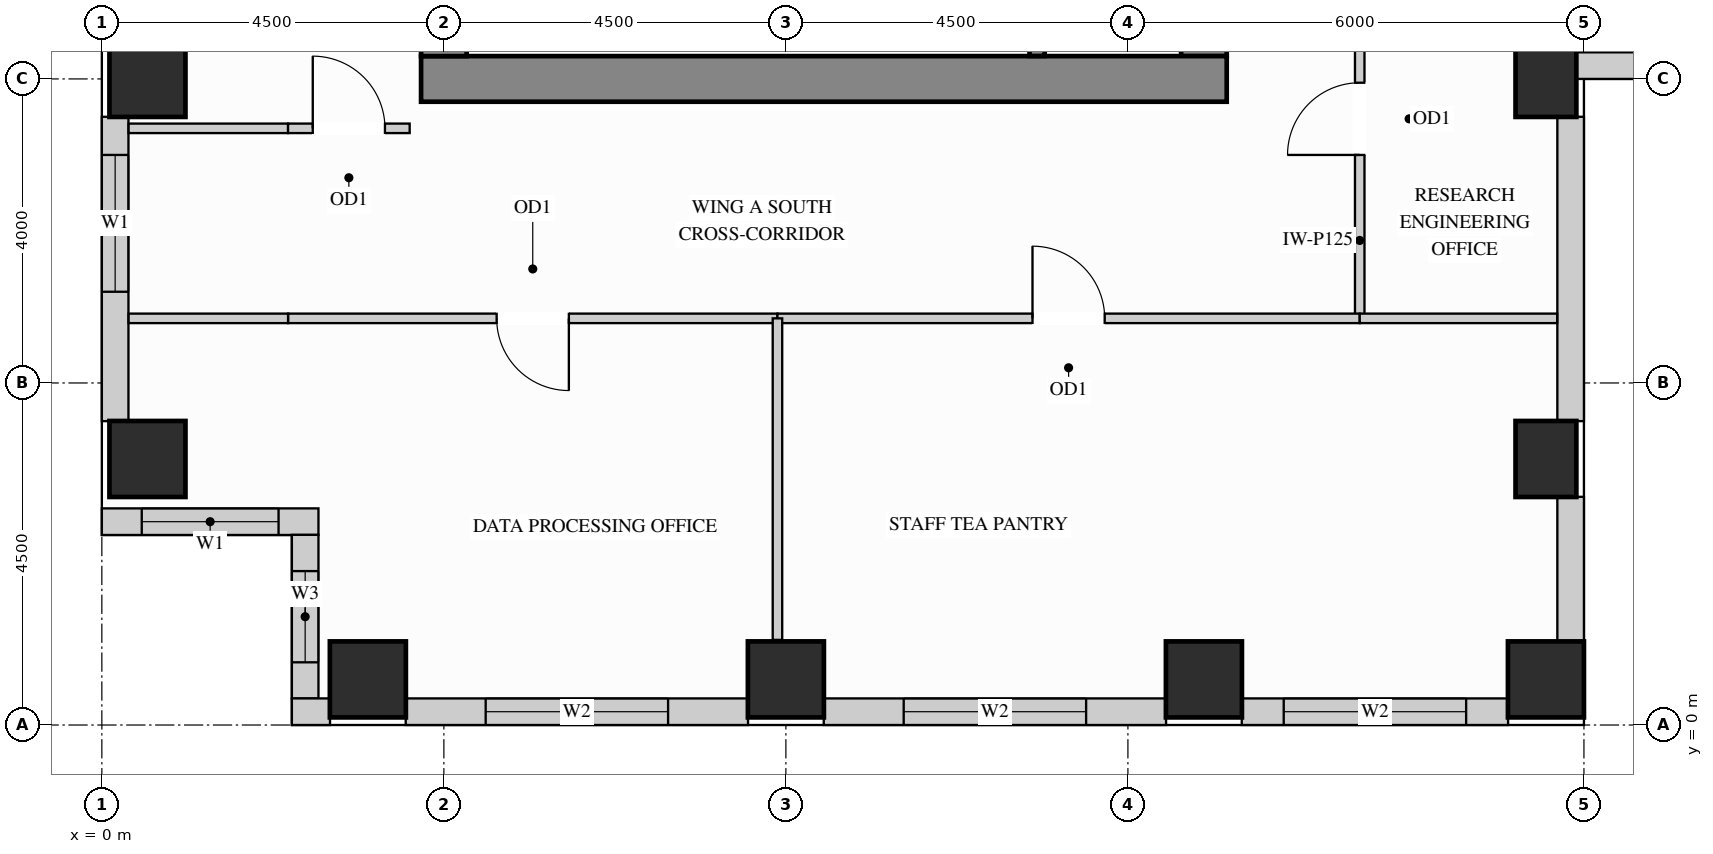
"""IFC4 building model, lengths in metres.
Left out: names, types, materials, properties, quantities, classifications, styles, units other than length and angle.
Written with IfcOpenShell. Run it as: python <this file> out.ifc"""

import sys

from ifc_helpers import new_model, si_unit, direction, frame, frame_2d, origin, origin_2d, place, context, subcontext, project, spatial, rectangle, extrude, source, transform, mapped, element, fill, save


model = new_model("IFC4")
c1 = context("Model", 3, precision=1e-05, world=origin(), true_north=direction((0.0, 1.0)))
c2 = subcontext(c1, "Body", "Model", "MODEL_VIEW")
j1 = project(units=[si_unit("LENGTHUNIT", "METRE"), si_unit("PLANEANGLEUNIT", "RADIAN")], contexts=[c1])
p1 = place(None, origin())
s1 = spatial("IfcSite", under=j1, at=p1, CompositionType="ELEMENT")
p2 = place(p1, origin())
s2 = spatial("IfcBuilding", under=s1, at=p2, CompositionType="ELEMENT")
p3 = place(p2, frame((0.0, 0.0, 161.1)))
s3 = spatial("IfcBuildingStorey", under=s2, at=p3, CompositionType="ELEMENT", Elevation=161.1)
m1 = source(origin(), c2, "Body", "SweptSolid", [
    extrude(rectangle(XDim=0.8, YDim=1.0, at=origin_2d()), origin(), (0.0, 0.0, 1.0), 3.4),
])
for number, where, z_axis, x_axis in (
    (1, (19.0, 3.5, 0.0), (0.0, 0.0, 1.0), (1.0, 0.0, 0.0)),
    (2, (19.0, 8.5, 0.0), (0.0, 0.0, 1.0), (1.0, 0.0, 0.0)),
):
    element("IfcColumn", number, at=place(p3, frame(where, z_axis=z_axis, x_axis=x_axis)), inside=s3, PredefinedType="COLUMN", context=c2, shape_type="MappedRepresentation", body=[
        mapped(m1, transform((0.0, 0.0, 0.0), x_axis=(1.0, 0.0, 0.0), y_axis=(0.0, 1.0, 0.0), z_axis=(0.0, 0.0, 1.0))),
    ])
m2 = source(origin(), c2, "Body", "SweptSolid", [
    extrude(rectangle(XDim=1.0, YDim=1.0, at=origin_2d()), origin(), (0.0, 0.0, 1.0), 3.4),
])
for number, where, z_axis, x_axis in (
    (3, (14.5, 0.6, 0.0), (0.0, 0.0, 1.0), (1.0, 0.0, 0.0)),
    (4, (19.0, 0.6, 0.0), (0.0, 0.0, 1.0), (1.0, 0.0, 0.0)),
    (5, (3.5, 0.6, 0.0), (0.0, 0.0, 1.0), (1.0, 0.0, 0.0)),
    (6, (9.0, 0.6, 0.0), (0.0, 0.0, 1.0), (1.0, 0.0, 0.0)),
    (7, (0.6, 3.5, 0.0), (0.0, 0.0, 1.0), (1.0, 0.0, 0.0)),
    (8, (0.6, 8.5, 0.0), (0.0, 0.0, 1.0), (1.0, 0.0, 0.0)),
):
    element("IfcColumn", number, at=place(p3, frame(where, z_axis=z_axis, x_axis=x_axis)), inside=s3, PredefinedType="COLUMN", context=c2, shape_type="MappedRepresentation", body=[
        mapped(m2, transform((0.0, 0.0, 0.0), x_axis=(1.0, 0.0, 0.0), y_axis=(0.0, 1.0, 0.0), z_axis=(0.0, 0.0, 1.0))),
    ])
m3 = source(origin(), c2, "Body", "SweptSolid", [
    extrude(rectangle(XDim=10.02, YDim=0.6, at=frame_2d((5.01, 0.0))), origin(), (0.0, 0.0, 1.0), 3.4),
])
p4 = place(p3, frame((14.5, 8.8, 0.0), z_axis=(0.0, 0.0, 1.0), x_axis=(0.0, 1.0, 0.0)))
e9 = element("IfcWall", 9, at=p4, inside=s3, PredefinedType="SHEAR", context=c2, shape_type="MappedRepresentation", body=[
    mapped(m3, transform((0.0, 0.0, 0.0), x_axis=(1.0, 0.0, 0.0), y_axis=(0.0, 1.0, 0.0), z_axis=(0.0, 0.0, 1.0))),
])
m4 = source(origin(), c2, "Body", "SweptSolid", [
    extrude(rectangle(XDim=10.6, YDim=0.6, at=frame_2d((5.3, 0.0))), origin(), (0.0, 0.0, 1.0), 3.4),
])
p5 = place(p3, frame((4.2, 8.5, 0.0), z_axis=(0.0, 0.0, 1.0), x_axis=(1.0, 0.0, 0.0)))
e10 = element("IfcWall", 10, at=p5, inside=s3, PredefinedType="SHEAR", context=c2, shape_type="MappedRepresentation", body=[
    mapped(m4, transform((0.0, 0.0, 0.0), x_axis=(1.0, 0.0, 0.0), y_axis=(0.0, 1.0, 0.0), z_axis=(0.0, 0.0, 1.0))),
])
m5 = source(origin(), c2, "Body", "SweptSolid", [
    extrude(rectangle(XDim=20.4, YDim=0.6, at=frame_2d((10.2, 0.0))), origin(), (0.0, 0.0, 1.0), 3.4),
])
p6 = place(p3, frame((4.5, 8.8, 0.0), z_axis=(0.0, 0.0, 1.0), x_axis=(0.0, 1.0, 0.0)))
e11 = element("IfcWall", 11, at=p6, inside=s3, PredefinedType="SHEAR", context=c2, shape_type="MappedRepresentation", body=[
    mapped(m5, transform((0.0, 0.0, 0.0), x_axis=(1.0, 0.0, 0.0), y_axis=(0.0, 1.0, 0.0), z_axis=(0.0, 0.0, 1.0))),
])
p7 = place(p3, frame((0.175, 8.002, 0.0), z_axis=(0.0, 0.0, 1.0), x_axis=(0.0, -1.0, 0.0)))
e12 = element("IfcWall", 12, at=p7, inside=s3, PredefinedType="SOLIDWALL", context=c2, shape_type="SweptSolid", body=[
    extrude(rectangle(XDim=4.004, YDim=0.35, at=frame_2d((2.002, 0.0))), origin(), (0.0, 0.0, 1.0), 2.612),
])
p8 = place(p7, frame((0.502, 0.0, 0.78)))
e13 = element("IfcOpeningElement", 13, at=p8, cuts=e12, PredefinedType="OPENING", context=c2, shape_type="SweptSolid", body=[
    extrude(rectangle(XDim=1.8, YDim=1.652, at=frame_2d((0.9, 0.826))), frame((0.0, 0.185, 0.0), z_axis=(0.0, -1.0, 0.0), x_axis=(1.0, 0.0, 0.0)), (0.0, 0.0, 1.0), 0.37),
])
p9 = place(p3, frame((0.0, 2.675, 0.0), z_axis=(0.0, 0.0, 1.0), x_axis=(1.0, 0.0, 0.0)))
e14 = element("IfcWall", 14, at=p9, inside=s3, PredefinedType="SOLIDWALL", context=c2, shape_type="SweptSolid", body=[
    extrude(rectangle(XDim=2.85, YDim=0.35, at=frame_2d((1.425, 0.0))), origin(), (0.0, 0.0, 1.0), 3.385),
])
p10 = place(p9, frame((0.525, 0.0, 0.78)))
e15 = element("IfcOpeningElement", 15, at=p10, cuts=e14, PredefinedType="OPENING", context=c2, shape_type="SweptSolid", body=[
    extrude(rectangle(XDim=1.8, YDim=2.1, at=frame_2d((0.9, 1.05))), frame((0.0, 0.185, 0.0), z_axis=(0.0, -1.0, 0.0), x_axis=(1.0, 0.0, 0.0)), (0.0, 0.0, 1.0), 0.37),
])
p11 = place(p3, frame((2.675, 2.502, 0.0), z_axis=(0.0, 0.0, 1.0), x_axis=(0.0, -1.0, 0.0)))
e16 = element("IfcWall", 16, at=p11, inside=s3, PredefinedType="SOLIDWALL", context=c2, shape_type="SweptSolid", body=[
    extrude(rectangle(XDim=2.154, YDim=0.35, at=frame_2d((1.077, 0.0))), origin(), (0.0, 0.0, 1.0), 3.385),
])
p12 = place(p11, frame((0.477, 0.0, 0.78)))
e17 = element("IfcOpeningElement", 17, at=p12, cuts=e16, PredefinedType="OPENING", context=c2, shape_type="SweptSolid", body=[
    extrude(rectangle(XDim=1.2, YDim=2.1, at=frame_2d((0.6, 1.05))), frame((0.0, 0.185, 0.0), z_axis=(0.0, -1.0, 0.0), x_axis=(1.0, 0.0, 0.0)), (0.0, 0.0, 1.0), 0.37),
])
m6 = source(origin(), c2, "Body", "SweptSolid", [
    extrude(rectangle(XDim=0.502, YDim=0.35, at=frame_2d((0.251, 0.0))), origin(), (0.0, 0.0, 1.0), 3.385),
])
p13 = place(p3, frame((2.5, 0.175, 0.0), z_axis=(0.0, 0.0, 1.0), x_axis=(1.0, 0.0, 0.0)))
e18 = element("IfcWall", 18, at=p13, inside=s3, PredefinedType="SOLIDWALL", context=c2, shape_type="MappedRepresentation", body=[
    mapped(m6, transform((0.0, 0.0, 0.0), x_axis=(1.0, 0.0, 0.0), y_axis=(0.0, 1.0, 0.0), z_axis=(0.0, 0.0, 1.0))),
])
p14 = place(p3, frame((3.998, 0.175, 0.0), z_axis=(0.0, 0.0, 1.0), x_axis=(1.0, 0.0, 0.0)))
e19 = element("IfcWall", 19, at=p14, inside=s3, PredefinedType="SOLIDWALL", context=c2, shape_type="SweptSolid", body=[
    extrude(rectangle(XDim=4.504, YDim=0.35, at=frame_2d((2.252, 0.0))), origin(), (0.0, 0.0, 1.0), 2.612),
])
p15 = place(p14, frame((1.052, 0.0, 0.78)))
e20 = element("IfcOpeningElement", 20, at=p15, cuts=e19, PredefinedType="OPENING", context=c2, shape_type="SweptSolid", body=[
    extrude(rectangle(XDim=2.4, YDim=1.652, at=frame_2d((1.2, 0.826))), frame((0.0, 0.185, 0.0), z_axis=(0.0, -1.0, 0.0), x_axis=(1.0, 0.0, 0.0)), (0.0, 0.0, 1.0), 0.37),
])
p16 = place(p3, frame((9.498, 0.175, 0.0), z_axis=(0.0, 0.0, 1.0), x_axis=(1.0, 0.0, 0.0)))
e21 = element("IfcWall", 21, at=p16, inside=s3, PredefinedType="SOLIDWALL", context=c2, shape_type="SweptSolid", body=[
    extrude(rectangle(XDim=4.504, YDim=0.35, at=frame_2d((2.252, 0.0))), origin(), (0.0, 0.0, 1.0), 2.612),
])
p17 = place(p16, frame((1.052, 0.0, 0.78)))
e22 = element("IfcOpeningElement", 22, at=p17, cuts=e21, PredefinedType="OPENING", context=c2, shape_type="SweptSolid", body=[
    extrude(rectangle(XDim=2.4, YDim=1.652, at=frame_2d((1.2, 0.826))), frame((0.0, 0.185, 0.0), z_axis=(0.0, -1.0, 0.0), x_axis=(1.0, 0.0, 0.0)), (0.0, 0.0, 1.0), 0.37),
])
p18 = place(p3, frame((14.998, 0.175, 0.0), z_axis=(0.0, 0.0, 1.0), x_axis=(1.0, 0.0, 0.0)))
e23 = element("IfcWall", 23, at=p18, inside=s3, PredefinedType="SOLIDWALL", context=c2, shape_type="SweptSolid", body=[
    extrude(rectangle(XDim=3.504, YDim=0.35, at=frame_2d((1.752, 0.0))), origin(), (0.0, 0.0, 1.0), 2.612),
])
p19 = place(p18, frame((0.552, 0.0, 0.78)))
e24 = element("IfcOpeningElement", 24, at=p19, cuts=e23, PredefinedType="OPENING", context=c2, shape_type="SweptSolid", body=[
    extrude(rectangle(XDim=2.4, YDim=1.652, at=frame_2d((1.2, 0.826))), frame((0.0, 0.185, 0.0), z_axis=(0.0, -1.0, 0.0), x_axis=(1.0, 0.0, 0.0)), (0.0, 0.0, 1.0), 0.37),
])
m7 = source(origin(), c2, "Body", "SweptSolid", [
    extrude(rectangle(XDim=1.904, YDim=0.35, at=frame_2d((0.952, 0.0))), origin(), (0.0, 0.0, 1.0), 2.612),
])
p20 = place(p3, frame((19.325, 1.098, 0.0), z_axis=(0.0, 0.0, 1.0), x_axis=(0.0, 1.0, 0.0)))
e25 = element("IfcWall", 25, at=p20, inside=s3, PredefinedType="SOLIDWALL", context=c2, shape_type="MappedRepresentation", body=[
    mapped(m7, transform((0.0, 0.0, 0.0), x_axis=(1.0, 0.0, 0.0), y_axis=(0.0, 1.0, 0.0), z_axis=(0.0, 0.0, 1.0))),
])
m8 = source(origin(), c2, "Body", "SweptSolid", [
    extrude(rectangle(XDim=4.004, YDim=0.35, at=frame_2d((2.002, 0.0))), origin(), (0.0, 0.0, 1.0), 2.612),
])
p21 = place(p3, frame((19.325, 3.998, 0.0), z_axis=(0.0, 0.0, 1.0), x_axis=(0.0, 1.0, 0.0)))
e26 = element("IfcWall", 26, at=p21, inside=s3, PredefinedType="SOLIDWALL", context=c2, shape_type="MappedRepresentation", body=[
    mapped(m8, transform((0.0, 0.0, 0.0), x_axis=(1.0, 0.0, 0.0), y_axis=(0.0, 1.0, 0.0), z_axis=(0.0, 0.0, 1.0))),
])
p22 = place(p3, frame((19.398, 8.675, 0.0), z_axis=(0.0, 0.0, 1.0), x_axis=(1.0, 0.0, 0.0)))
e27 = element("IfcWall", 27, at=p22, inside=s3, PredefinedType="SOLIDWALL", context=c2, shape_type="SweptSolid", body=[
    extrude(rectangle(XDim=3.604, YDim=0.35, at=frame_2d((1.802, 0.0))), origin(), (0.0, 0.0, 1.0), 3.385),
])
p23 = place(p22, frame((1.067, 0.0, 0.78)))
e28 = element("IfcOpeningElement", 28, at=p23, cuts=e27, PredefinedType="OPENING", context=c2, shape_type="SweptSolid", body=[
    extrude(rectangle(XDim=1.5, YDim=2.0, at=frame_2d((0.75, 1.0))), frame((0.0, 0.185, 0.0), z_axis=(0.0, -1.0, 0.0), x_axis=(1.0, 0.0, 0.0)), (0.0, 0.0, 1.0), 0.37),
])
p24 = place(p3, frame((16.55, 5.35, 0.0), z_axis=(0.0, 0.0, 1.0), x_axis=(0.0, 1.0, 0.0)))
e29 = element("IfcWall", 29, at=p24, inside=s3, PredefinedType="PARTITIONING", context=c2, shape_type="SweptSolid", body=[
    extrude(rectangle(XDim=5.25, YDim=0.125, at=frame_2d((2.625, 0.0))), origin(), (0.0, 0.0, 1.0), 3.385),
])
p25 = place(p24, frame((2.15, 0.0, 0.0)))
e30 = element("IfcOpeningElement", 30, at=p25, cuts=e29, PredefinedType="OPENING", context=c2, shape_type="SweptSolid", body=[
    extrude(rectangle(XDim=0.95, YDim=2.15, at=frame_2d((0.475, 1.075))), frame((0.0, 0.073, 0.0), z_axis=(0.0, -1.0, 0.0), x_axis=(1.0, 0.0, 0.0)), (0.0, 0.0, 1.0), 0.145),
])
m9 = source(origin(), c2, "Body", "SweptSolid", [
    extrude(rectangle(XDim=2.098, YDim=0.125, at=frame_2d((1.049, 0.0))), origin(), (0.0, 0.0, 1.0), 3.385),
])
p26 = place(p3, frame((0.352, 7.85, 0.0), z_axis=(0.0, 0.0, 1.0), x_axis=(1.0, 0.0, 0.0)))
e31 = element("IfcWall", 31, at=p26, inside=s3, PredefinedType="PARTITIONING", context=c2, shape_type="MappedRepresentation", body=[
    mapped(m9, transform((0.0, 0.0, 0.0), x_axis=(1.0, 0.0, 0.0), y_axis=(0.0, 1.0, 0.0), z_axis=(0.0, 0.0, 1.0))),
])
p27 = place(p3, frame((2.45, 7.85, 0.0), z_axis=(0.0, 0.0, 1.0), x_axis=(1.0, 0.0, 0.0)))
e32 = element("IfcWall", 32, at=p27, inside=s3, PredefinedType="PARTITIONING", context=c2, shape_type="SweptSolid", body=[
    extrude(rectangle(XDim=1.6, YDim=0.125, at=frame_2d((0.8, 0.0))), origin(), (0.0, 0.0, 1.0), 3.385),
])
p28 = place(p27, frame((0.325, 0.0, 0.0)))
e33 = element("IfcOpeningElement", 33, at=p28, cuts=e32, PredefinedType="OPENING", context=c2, shape_type="SweptSolid", body=[
    extrude(rectangle(XDim=0.95, YDim=2.15, at=frame_2d((0.475, 1.075))), frame((0.0, 0.073, 0.0), z_axis=(0.0, -1.0, 0.0), x_axis=(1.0, 0.0, 0.0)), (0.0, 0.0, 1.0), 0.145),
])
p29 = place(p3, frame((2.45, 5.35, 0.0), z_axis=(0.0, 0.0, 1.0), x_axis=(1.0, 0.0, 0.0)))
e34 = element("IfcWall", 34, at=p29, inside=s3, PredefinedType="PARTITIONING", context=c2, shape_type="SweptSolid", body=[
    extrude(rectangle(XDim=6.439, YDim=0.125, at=frame_2d((3.219, 0.0))), origin(), (0.0, 0.0, 1.0), 3.385),
])
p30 = place(p29, frame((2.744, 0.0, 0.0)))
e35 = element("IfcOpeningElement", 35, at=p30, cuts=e34, PredefinedType="OPENING", context=c2, shape_type="SweptSolid", body=[
    extrude(rectangle(XDim=0.95, YDim=2.15, at=frame_2d((0.475, 1.075))), frame((0.0, 0.073, 0.0), z_axis=(0.0, -1.0, 0.0), x_axis=(1.0, 0.0, 0.0)), (0.0, 0.0, 1.0), 0.145),
])
p31 = place(p3, frame((8.889, 5.35, 0.0), z_axis=(0.0, 0.0, 1.0), x_axis=(1.0, 0.0, 0.0)))
e36 = element("IfcWall", 36, at=p31, inside=s3, PredefinedType="PARTITIONING", context=c2, shape_type="SweptSolid", body=[
    extrude(rectangle(XDim=7.661, YDim=0.125, at=frame_2d((3.831, 0.0))), origin(), (0.0, 0.0, 1.0), 3.385),
])
p32 = place(p31, frame((3.355, 0.0, 0.0)))
e37 = element("IfcOpeningElement", 37, at=p32, cuts=e36, PredefinedType="OPENING", context=c2, shape_type="SweptSolid", body=[
    extrude(rectangle(XDim=0.95, YDim=2.15, at=frame_2d((0.475, 1.075))), frame((0.0, 0.073, 0.0), z_axis=(0.0, -1.0, 0.0), x_axis=(1.0, 0.0, 0.0)), (0.0, 0.0, 1.0), 0.145),
])
p33 = place(p3, frame((0.352, 5.35, 0.0), z_axis=(0.0, 0.0, 1.0), x_axis=(1.0, 0.0, 0.0)))
e38 = element("IfcWall", 38, at=p33, inside=s3, PredefinedType="PARTITIONING", context=c2, shape_type="MappedRepresentation", body=[
    mapped(m9, transform((0.0, 0.0, 0.0), x_axis=(1.0, 0.0, 0.0), y_axis=(0.0, 1.0, 0.0), z_axis=(0.0, 0.0, 1.0))),
])
m10 = source(origin(), c2, "Body", "SweptSolid", [
    extrude(rectangle(XDim=2.598, YDim=0.125, at=frame_2d((1.299, 0.0))), origin(), (0.0, 0.0, 1.0), 3.385),
])
p34 = place(p3, frame((16.55, 5.35, 0.0), z_axis=(0.0, 0.0, 1.0), x_axis=(1.0, 0.0, 0.0)))
e39 = element("IfcWall", 39, at=p34, inside=s3, PredefinedType="PARTITIONING", context=c2, shape_type="MappedRepresentation", body=[
    mapped(m10, transform((0.0, 0.0, 0.0), x_axis=(1.0, 0.0, 0.0), y_axis=(0.0, 1.0, 0.0), z_axis=(0.0, 0.0, 1.0))),
])
m11 = source(origin(), c2, "Body", "SweptSolid", [
    extrude(rectangle(XDim=4.23, YDim=0.125, at=frame_2d((2.115, 0.0))), origin(), (0.0, 0.0, 1.0), 3.385),
])
p35 = place(p3, frame((8.889, 1.12, 0.0), z_axis=(0.0, 0.0, 1.0), x_axis=(0.0, 1.0, 0.0)))
e40 = element("IfcWall", 40, at=p35, inside=s3, PredefinedType="PARTITIONING", context=c2, shape_type="MappedRepresentation", body=[
    mapped(m11, transform((0.0, 0.0, 0.0), x_axis=(1.0, 0.0, 0.0), y_axis=(0.0, 1.0, 0.0), z_axis=(0.0, 0.0, 1.0))),
])
m12 = source(origin(), c2, "Body", "SweptSolid", [
    extrude(rectangle(XDim=3.753, YDim=0.2, at=frame_2d((1.876, 0.0))), origin(), (0.0, 0.0, 1.0), 3.4),
])
p36 = place(p3, frame((12.305, 8.802, 0.0), z_axis=(0.0, 0.0, 1.0), x_axis=(0.0, 1.0, 0.0)))
e41 = element("IfcWall", 41, at=p36, inside=s3, PredefinedType="SHEAR", context=c2, shape_type="MappedRepresentation", body=[
    mapped(m12, transform((0.0, 0.0, 0.0), x_axis=(1.0, 0.0, 0.0), y_axis=(0.0, 1.0, 0.0), z_axis=(0.0, 0.0, 1.0))),
])
m13 = source(origin(), c2, "Body", "SweptSolid", [
    extrude(rectangle(XDim=0.95, YDim=2.15, at=frame_2d((0.475, 1.075))), frame((0.0, 0.025, 0.0), z_axis=(0.0, -1.0, 0.0), x_axis=(1.0, 0.0, 0.0)), (0.0, 0.0, 1.0), 0.05),
])
p37 = place(p25, origin())
e42 = element("IfcDoor", 42, at=p37, inside=s3, OperationType="SINGLE_SWING_LEFT", PredefinedType="DOOR", context=c2, shape_type="MappedRepresentation", body=[
    mapped(m13, transform((0.0, 0.0, 0.0), x_axis=(1.0, 0.0, 0.0), y_axis=(0.0, 1.0, 0.0), z_axis=(0.0, 0.0, 1.0))),
])
fill(e30, e42)
p38 = place(p30, origin())
e43 = element("IfcDoor", 43, at=p38, inside=s3, OperationType="SINGLE_SWING_RIGHT", PredefinedType="DOOR", context=c2, shape_type="MappedRepresentation", body=[
    mapped(m13, transform((0.0, 0.0, 0.0), x_axis=(1.0, 0.0, 0.0), y_axis=(0.0, 1.0, 0.0), z_axis=(0.0, 0.0, 1.0))),
])
fill(e35, e43)
p39 = place(p32, origin())
e44 = element("IfcDoor", 44, at=p39, inside=s3, OperationType="SINGLE_SWING_LEFT", PredefinedType="DOOR", context=c2, shape_type="MappedRepresentation", body=[
    mapped(m13, transform((0.0, 0.0, 0.0), x_axis=(1.0, 0.0, 0.0), y_axis=(0.0, 1.0, 0.0), z_axis=(0.0, 0.0, 1.0))),
])
fill(e37, e44)
p40 = place(p28, origin())
e45 = element("IfcDoor", 45, at=p40, inside=s3, OperationType="SINGLE_SWING_LEFT", PredefinedType="DOOR", context=c2, shape_type="MappedRepresentation", body=[
    mapped(m13, transform((0.0, 0.0, 0.0), x_axis=(1.0, 0.0, 0.0), y_axis=(0.0, 1.0, 0.0), z_axis=(0.0, 0.0, 1.0))),
])
fill(e33, e45)
m14 = source(origin(), c2, "Body", "SweptSolid", [
    extrude(rectangle(XDim=1.8, YDim=1.652, at=frame_2d((0.9, 0.826))), frame((0.0, 0.03, 0.0), z_axis=(0.0, -1.0, 0.0), x_axis=(1.0, 0.0, 0.0)), (0.0, 0.0, 1.0), 0.06),
])
p41 = place(p8, origin())
e46 = element("IfcWindow", 46, at=p41, inside=s3, PartitioningType="SINGLE_PANEL", PredefinedType="WINDOW", context=c2, shape_type="MappedRepresentation", body=[
    mapped(m14, transform((0.0, 0.0, 0.0), x_axis=(1.0, 0.0, 0.0), y_axis=(0.0, 1.0, 0.0), z_axis=(0.0, 0.0, 1.0))),
])
fill(e13, e46)
m15 = source(origin(), c2, "Body", "SweptSolid", [
    extrude(rectangle(XDim=1.8, YDim=2.1, at=frame_2d((0.9, 1.05))), frame((0.0, 0.03, 0.0), z_axis=(0.0, -1.0, 0.0), x_axis=(1.0, 0.0, 0.0)), (0.0, 0.0, 1.0), 0.06),
])
p42 = place(p10, origin())
e47 = element("IfcWindow", 47, at=p42, inside=s3, PartitioningType="SINGLE_PANEL", PredefinedType="WINDOW", context=c2, shape_type="MappedRepresentation", body=[
    mapped(m15, transform((0.0, 0.0, 0.0), x_axis=(1.0, 0.0, 0.0), y_axis=(0.0, 1.0, 0.0), z_axis=(0.0, 0.0, 1.0))),
])
fill(e15, e47)
m16 = source(origin(), c2, "Body", "SweptSolid", [
    extrude(rectangle(XDim=2.4, YDim=1.652, at=frame_2d((1.2, 0.826))), frame((0.0, 0.03, 0.0), z_axis=(0.0, -1.0, 0.0), x_axis=(1.0, 0.0, 0.0)), (0.0, 0.0, 1.0), 0.06),
])
p43 = place(p15, origin())
e48 = element("IfcWindow", 48, at=p43, inside=s3, PartitioningType="SINGLE_PANEL", PredefinedType="WINDOW", context=c2, shape_type="MappedRepresentation", body=[
    mapped(m16, transform((0.0, 0.0, 0.0), x_axis=(1.0, 0.0, 0.0), y_axis=(0.0, 1.0, 0.0), z_axis=(0.0, 0.0, 1.0))),
])
fill(e20, e48)
p44 = place(p17, origin())
e49 = element("IfcWindow", 49, at=p44, inside=s3, PartitioningType="SINGLE_PANEL", PredefinedType="WINDOW", context=c2, shape_type="MappedRepresentation", body=[
    mapped(m16, transform((0.0, 0.0, 0.0), x_axis=(1.0, 0.0, 0.0), y_axis=(0.0, 1.0, 0.0), z_axis=(0.0, 0.0, 1.0))),
])
fill(e22, e49)
p45 = place(p19, origin())
e50 = element("IfcWindow", 50, at=p45, inside=s3, PartitioningType="SINGLE_PANEL", PredefinedType="WINDOW", context=c2, shape_type="MappedRepresentation", body=[
    mapped(m16, transform((0.0, 0.0, 0.0), x_axis=(1.0, 0.0, 0.0), y_axis=(0.0, 1.0, 0.0), z_axis=(0.0, 0.0, 1.0))),
])
fill(e24, e50)
m17 = source(origin(), c2, "Body", "SweptSolid", [
    extrude(rectangle(XDim=1.2, YDim=2.1, at=frame_2d((0.6, 1.05))), frame((0.0, 0.03, 0.0), z_axis=(0.0, -1.0, 0.0), x_axis=(1.0, 0.0, 0.0)), (0.0, 0.0, 1.0), 0.06),
])
p46 = place(p12, origin())
e51 = element("IfcWindow", 51, at=p46, inside=s3, PartitioningType="SINGLE_PANEL", PredefinedType="WINDOW", context=c2, shape_type="MappedRepresentation", body=[
    mapped(m17, transform((0.0, 0.0, 0.0), x_axis=(1.0, 0.0, 0.0), y_axis=(0.0, 1.0, 0.0), z_axis=(0.0, 0.0, 1.0))),
])
fill(e17, e51)
save(model, sys.argv[1])
